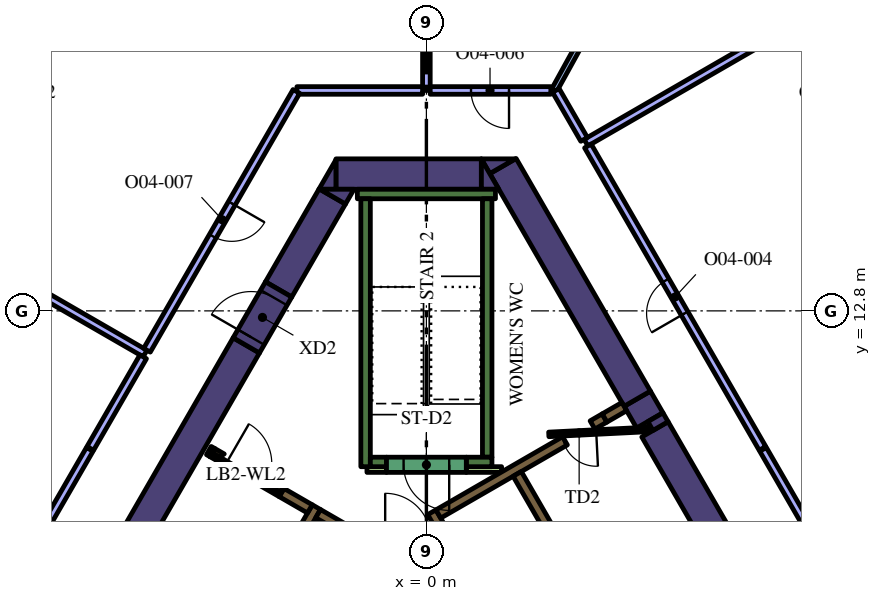
"""IFC4 building model, lengths in metres.
Left out: names, types, materials, properties, quantities, classifications, styles, units other than length and angle.
Written with IfcOpenShell. Run it as: python <this file> out.ifc"""

import sys

from ifc_helpers import new_model, si_unit, direction, frame, frame_2d, origin, place, context, subcontext, project, spatial, polyline, rectangle, outline, extrude, element, fill, save


model = new_model("IFC4")
c1 = context("Model", 3, precision=1e-05, world=origin(), true_north=direction((0.0, 1.0)))
c2 = subcontext(c1, "Body", "Model", "MODEL_VIEW")
j1 = project(units=[si_unit("LENGTHUNIT", "METRE"), si_unit("PLANEANGLEUNIT", "RADIAN")], contexts=[c1])
p1 = place(None, origin())
s1 = spatial("IfcSite", under=j1, at=p1, CompositionType="ELEMENT")
p2 = place(p1, origin())
s2 = spatial("IfcBuilding", under=s1, at=p2, CompositionType="ELEMENT")
p3 = place(p2, frame((0.0, 0.0, 179.4)))
s3 = spatial("IfcBuildingStorey", under=s2, at=p3, CompositionType="ELEMENT", Elevation=179.4)
p4 = place(p3, frame((5.878, 9.918, 0.0), z_axis=(0.0, 0.0, 1.0), x_axis=(-0.499893918903, 0.866086641072, 0.0)))
e1 = element("IfcWall", 1, at=p4, inside=s3, PredefinedType="SOLIDWALL", context=c2, shape_type="SweptSolid", body=[
    extrude(rectangle(XDim=0.657, YDim=0.8, at=frame_2d((0.329, 0.0))), origin(), (0.0, 0.0, 1.0), 4.2),
])
p5 = place(p3, frame((8.279, 5.761, 0.0), z_axis=(0.0, 0.0, 1.0), x_axis=(-0.500024261398, 0.866011396007, 0.0)))
e2 = element("IfcWall", 2, at=p5, inside=s3, PredefinedType="SOLIDWALL", context=c2, shape_type="SweptSolid", body=[
    extrude(rectangle(XDim=4.528, YDim=0.8, at=frame_2d((2.264, 0.0))), origin(), (0.0, 0.0, 1.0), 4.2),
])
p6 = place(p3, origin())
e3 = element("IfcWall", 3, at=p6, inside=s3, PredefinedType="SOLIDWALL", context=c2, shape_type="SweptSolid", body=[
    extrude(outline(polyline([(5.961, 9.654), (5.827, 9.886), (6.226, 10.116), (6.36, 9.884), (5.961, 9.654)])), origin(), (0.0, 0.0, 1.0), 4.2),
])
p7 = place(p3, frame((5.549, 10.489, 0.0), z_axis=(0.0, 0.0, 1.0), x_axis=(-0.50001746176, 0.866015321998, 0.0)))
e4 = element("IfcWall", 4, at=p7, inside=s3, PredefinedType="SOLIDWALL", context=c2, shape_type="SweptSolid", body=[
    extrude(rectangle(XDim=7.068, YDim=0.8, at=frame_2d((3.534, 0.0))), origin(), (0.0, 0.0, 1.0), 4.2),
])
e5 = element("IfcWall", 5, at=p6, inside=s3, PredefinedType="SOLIDWALL", context=c2, shape_type="SweptSolid", body=[
    extrude(outline(polyline([(1.443, 16.8), (2.339, 16.8), (1.667, 16.412), (1.443, 16.8)])), origin(), (0.0, 0.0, 1.0), 4.2),
])
p8 = place(p3, frame((-2.379, 16.4, 0.0), z_axis=(0.0, 0.0, 1.0), x_axis=(1.0, 0.0, 0.0)))
e6 = element("IfcWall", 6, at=p8, inside=s3, PredefinedType="SOLIDWALL", context=c2, shape_type="SweptSolid", body=[
    extrude(rectangle(XDim=3.824, YDim=0.8, at=frame_2d((1.912, 0.0))), origin(), (0.0, 0.0, 1.0), 4.2),
])
e7 = element("IfcWall", 7, at=p6, inside=s3, PredefinedType="SOLIDWALL", context=c2, shape_type="SweptSolid", body=[
    extrude(outline(polyline([(1.905, 16.0), (1.447, 16.0), (1.447, 16.793), (1.905, 16.0)])), origin(), (0.0, 0.0, 1.0), 4.2),
])
e8 = element("IfcWall", 8, at=p6, inside=s3, PredefinedType="SOLIDWALL", context=c2, shape_type="SweptSolid", body=[
    extrude(outline(polyline([(-2.829, 16.0), (-2.381, 16.776), (-2.381, 16.0), (-2.829, 16.0)])), origin(), (0.0, 0.0, 1.0), 4.2),
])
p9 = place(p3, frame((-2.477, 15.81, 0.0), z_axis=(0.0, 0.0, 1.0), x_axis=(-0.499969377405, -0.866043083026, 0.0)))
e9 = element("IfcWall", 9, at=p9, inside=s3, PredefinedType="SOLIDWALL", context=c2, shape_type="SweptSolid", body=[
    extrude(rectangle(XDim=2.824, YDim=0.8, at=frame_2d((1.412, 0.0))), origin(), (0.0, 0.0, 1.0), 4.2),
])
e10 = element("IfcWall", 10, at=p6, inside=s3, PredefinedType="SOLIDWALL", context=c2, shape_type="SweptSolid", body=[
    extrude(outline(polyline([(-1.905, 16.0), (-2.129, 15.612), (-2.801, 16.0), (-1.905, 16.0)])), origin(), (0.0, 0.0, 1.0), 4.2),
])
p10 = place(p3, frame((-12.668, -1.842, 0.0), z_axis=(0.0, 0.0, 1.0), x_axis=(0.500003640647, 0.866023301845, 0.0)))
e11 = element("IfcWall", 11, at=p10, inside=s3, PredefinedType="SOLIDWALL", context=c2, shape_type="SweptSolid", body=[
    extrude(rectangle(XDim=15.858, YDim=0.8, at=frame_2d((7.929, 0.0))), origin(), (0.0, 0.0, 1.0), 4.2),
])
p11 = place(p3, frame((-1.817, 15.875, 0.0), z_axis=(0.0, 0.0, 1.0), x_axis=(1.0, 0.0, 0.0)))
e12 = element("IfcWall", 12, at=p11, inside=s3, PredefinedType="SOLIDWALL", context=c2, shape_type="SweptSolid", body=[
    extrude(rectangle(XDim=3.634, YDim=0.25, at=frame_2d((1.817, 0.0))), origin(), (0.0, 0.0, 1.0), 4.2),
])
p12 = place(p3, frame((1.6, 8.95, 0.0), z_axis=(0.0, 0.0, 1.0), x_axis=(0.0, 1.0, 0.0)))
e13 = element("IfcWall", 13, at=p12, inside=s3, PredefinedType="SOLIDWALL", context=c2, shape_type="SweptSolid", body=[
    extrude(rectangle(XDim=6.8, YDim=0.25, at=frame_2d((3.4, 0.0))), origin(), (0.0, 0.0, 1.0), 4.2),
])
p13 = place(p3, frame((1.05, 8.825, 0.0), z_axis=(0.0, 0.0, 1.0), x_axis=(1.0, 0.0, 0.0)))
e14 = element("IfcWall", 14, at=p13, inside=s3, PredefinedType="SOLIDWALL", context=c2, shape_type="SweptSolid", body=[
    extrude(rectangle(XDim=0.675, YDim=0.25, at=frame_2d((0.337, 0.0))), origin(), (0.0, 0.0, 1.0), 4.2),
])
p14 = place(p3, frame((-1.6, 8.7, 0.0), z_axis=(0.0, 0.0, 1.0), x_axis=(0.0, 1.0, 0.0)))
e15 = element("IfcWall", 15, at=p14, inside=s3, PredefinedType="SOLIDWALL", context=c2, shape_type="SweptSolid", body=[
    extrude(rectangle(XDim=7.05, YDim=0.25, at=frame_2d((3.525, 0.0))), origin(), (0.0, 0.0, 1.0), 4.2),
])
p15 = place(p3, frame((-1.475, 8.825, 0.0), z_axis=(0.0, 0.0, 1.0), x_axis=(1.0, 0.0, 0.0)))
e16 = element("IfcWall", 16, at=p15, inside=s3, PredefinedType="SOLIDWALL", context=c2, shape_type="SweptSolid", body=[
    extrude(rectangle(XDim=0.425, YDim=0.25, at=frame_2d((0.212, 0.0))), origin(), (0.0, 0.0, 1.0), 4.2),
])
p16 = place(p3, frame((0.417, 7.027, 0.0), z_axis=(0.0, 0.0, 1.0), x_axis=(-0.500210807569, 0.865903659763, 0.0)))
e17 = element("IfcWall", 17, at=p16, inside=s3, PredefinedType="SOLIDWALL", context=c2, shape_type="SweptSolid", body=[
    extrude(rectangle(XDim=0.548, YDim=0.25, at=frame_2d((0.274, 0.0))), origin(), (0.0, 0.0, 1.0), 4.2),
])
p17 = place(p3, frame((3.647, 9.38, 0.0), z_axis=(0.0, 0.0, 1.0), x_axis=(-0.866025015791, -0.500000672024, 0.0)))
e18 = element("IfcWall", 18, at=p17, inside=s3, PredefinedType="SOLIDWALL", context=c2, shape_type="SweptSolid", body=[
    extrude(rectangle(XDim=3.849, YDim=0.25, at=frame_2d((1.924, 0.0))), origin(), (0.0, 0.0, 1.0), 4.2),
])
p18 = place(p3, frame((4.688, 9.981, 0.0), z_axis=(0.0, 0.0, 1.0), x_axis=(-0.865974312977, -0.500088481434, 0.0)))
e19 = element("IfcWall", 19, at=p18, inside=s3, PredefinedType="SOLIDWALL", context=c2, shape_type="SweptSolid", body=[
    extrude(rectangle(XDim=0.366, YDim=0.25, at=frame_2d((0.183, 0.0))), origin(), (0.0, 0.0, 1.0), 4.2),
])
p19 = place(p3, frame((4.689, 9.982, 0.0), z_axis=(0.0, 0.0, 1.0), x_axis=(0.865947592822, 0.500134748329, 0.0)))
e20 = element("IfcWall", 20, at=p19, inside=s3, PredefinedType="SOLIDWALL", context=c2, shape_type="SweptSolid", body=[
    extrude(rectangle(XDim=0.598, YDim=0.25, at=frame_2d((0.299, 0.0))), origin(), (0.0, 0.0, 1.0), 4.2),
])
p20 = place(p3, frame((-8.06, -1.311, 0.0), z_axis=(0.0, 0.0, 1.0), x_axis=(0.50000273126, 0.866023826885, 0.0)))
e21 = element("IfcWall", 21, at=p20, inside=s3, PredefinedType="SOLIDWALL", context=c2, shape_type="SweptSolid", body=[
    extrude(rectangle(XDim=10.33, YDim=0.25, at=frame_2d((5.165, 0.0))), origin(), (0.0, 0.0, 1.0), 4.2),
])
p21 = place(p3, frame((-1.76, 6.836, 0.0), z_axis=(0.0, 0.0, 1.0), x_axis=(-0.865952863304, 0.500125622755, 0.0)))
e22 = element("IfcWall", 22, at=p21, inside=s3, PredefinedType="SOLIDWALL", context=c2, shape_type="SweptSolid", body=[
    extrude(rectangle(XDim=1.258, YDim=0.25, at=frame_2d((0.629, 0.0))), origin(), (0.0, 0.0, 1.0), 4.2),
])
p22 = place(p3, frame((-5.725, 9.125, 0.0), z_axis=(0.0, 0.0, 1.0), x_axis=(0.866185586049, -0.49972245349, 0.0)))
e23 = element("IfcWall", 23, at=p22, inside=s3, PredefinedType="SOLIDWALL", context=c2, shape_type="SweptSolid", body=[
    extrude(rectangle(XDim=0.11, YDim=0.25, at=frame_2d((0.055, 0.0))), origin(), (0.0, 0.0, 1.0), 4.2),
])
p23 = place(p3, frame((-3.066, 7.59, 0.0), z_axis=(0.0, 0.0, 1.0), x_axis=(-0.866081358704, 0.49990307071, 0.0)))
e24 = element("IfcWall", 24, at=p23, inside=s3, PredefinedType="SOLIDWALL", context=c2, shape_type="SweptSolid", body=[
    extrude(rectangle(XDim=0.858, YDim=0.25, at=frame_2d((0.429, 0.0))), origin(), (0.0, 0.0, 1.0), 4.2),
])
e25 = element("IfcWall", 25, at=p6, inside=s3, PredefinedType="SOLIDWALL", context=c2, shape_type="SweptSolid", body=[
    extrude(outline(polyline([(-3.748, 8.128), (-3.813, 8.015), (-4.027, 8.139), (-4.017, 8.156), (-4.008, 8.173), (-4.0, 8.192), (-3.995, 8.21), (-3.991, 8.23), (-3.99, 8.25), (-3.99, 8.268), (-3.748, 8.128)])), origin(), (0.0, 0.0, 1.0), 4.2),
])
e26 = element("IfcWall", 26, at=p6, inside=s3, PredefinedType="SOLIDWALL", context=c2, shape_type="SweptSolid", body=[
    extrude(outline(polyline([(-5.689, 8.96), (-5.69, 8.961), (-5.565, 9.177), (-5.319, 9.035), (-5.335, 9.026), (-5.351, 9.015), (-5.366, 9.002), (-5.379, 8.988), (-5.392, 8.972), (-5.402, 8.956), (-5.412, 8.939), (-5.629, 9.064), (-5.629, 9.064), (-5.689, 8.96)])), origin(), (0.0, 0.0, 1.0), 4.2),
])
p24 = place(p3, frame((1.05, 8.625, 0.0), z_axis=(0.0, 0.0, 1.0), x_axis=(1.0, 0.0, 0.0)))
e27 = element("IfcWall", 27, at=p24, inside=s3, PredefinedType="PARTITIONING", context=c2, shape_type="SweptSolid", body=[
    extrude(rectangle(XDim=0.929, YDim=0.15, at=frame_2d((0.464, 0.0))), origin(), (0.0, 0.0, 1.0), 3.15),
])
p25 = place(p3, frame((-1.564, 8.625, 0.0), z_axis=(0.0, 0.0, 1.0), x_axis=(1.0, 0.0, 0.0)))
e28 = element("IfcWall", 28, at=p25, inside=s3, PredefinedType="PARTITIONING", context=c2, shape_type="SweptSolid", body=[
    extrude(rectangle(XDim=0.514, YDim=0.15, at=frame_2d((0.257, 0.0))), origin(), (0.0, 0.0, 1.0), 3.15),
])
p26 = place(p3, frame((8.565, -2.185, 0.0), z_axis=(0.0, 0.0, 1.0), x_axis=(-0.499997954832, 0.866026584559, 0.0)))
e29 = element("IfcWall", 29, at=p26, inside=s3, PredefinedType="SOLIDWALL", context=c2, shape_type="SweptSolid", body=[
    extrude(rectangle(XDim=12.35, YDim=0.25, at=frame_2d((6.175, 0.0))), origin(), (0.0, 0.0, 1.0), 4.2),
])
p27 = place(p26, frame((0.585, 0.0, 0.0)))
e30 = element("IfcOpeningElement", 30, at=p27, cuts=e29, PredefinedType="OPENING", context=c2, shape_type="SweptSolid", body=[
    extrude(rectangle(XDim=1.1, YDim=2.1, at=frame_2d((0.55, 1.05))), frame((0.0, 0.135, 0.0), z_axis=(0.0, -1.0, 0.0), x_axis=(1.0, 0.0, 0.0)), (0.0, 0.0, 1.0), 0.27),
])
p28 = place(p3, frame((1.05, 8.75, 0.0), z_axis=(0.0, 0.0, 1.0), x_axis=(-1.0, 0.0, 0.0)))
e31 = element("IfcWall", 31, at=p28, inside=s3, PredefinedType="SOLIDWALL", context=c2, shape_type="SweptSolid", body=[
    extrude(rectangle(XDim=2.1, YDim=0.4, at=frame_2d((1.05, 0.0))), origin(), (0.0, 0.0, 1.0), 4.2),
])
p29 = place(p28, frame((0.45, 0.0, 0.0)))
e32 = element("IfcOpeningElement", 32, at=p29, cuts=e31, PredefinedType="OPENING", context=c2, shape_type="SweptSolid", body=[
    extrude(rectangle(XDim=1.2, YDim=2.1, at=frame_2d((0.6, 1.05))), frame((0.0, 0.21, 0.0), z_axis=(0.0, -1.0, 0.0), x_axis=(1.0, 0.0, 0.0)), (0.0, 0.0, 1.0), 0.42),
])
p30 = place(p3, frame((5.917, 9.684, 0.0), z_axis=(0.0, 0.0, 1.0), x_axis=(-0.998758194515, -0.049820366212, 0.0)))
e33 = element("IfcWall", 33, at=p30, inside=s3, PredefinedType="PARTITIONING", context=c2, shape_type="SweptSolid", body=[
    extrude(rectangle(XDim=2.7, YDim=0.12, at=frame_2d((1.35, 0.0))), origin(), (0.0, 0.0, 1.0), 3.15),
])
p31 = place(p30, frame((1.45, 0.0, 0.0)))
e34 = element("IfcOpeningElement", 34, at=p31, cuts=e33, PredefinedType="OPENING", context=c2, shape_type="SweptSolid", body=[
    extrude(rectangle(XDim=0.9, YDim=2.1, at=frame_2d((0.45, 1.05))), frame((0.0, 0.07, 0.0), z_axis=(0.0, -1.0, 0.0), x_axis=(1.0, 0.0, 0.0)), (0.0, 0.0, 1.0), 0.14),
])
p32 = place(p3, frame((-5.659, 9.012, 0.0), z_axis=(0.0, 0.0, 1.0), x_axis=(0.866009402589, -0.500027713859, 0.0)))
e35 = element("IfcWall", 35, at=p32, inside=s3, PredefinedType="PARTITIONING", context=c2, shape_type="SweptSolid", body=[
    extrude(rectangle(XDim=2.1, YDim=0.12, at=frame_2d((1.05, 0.0))), origin(), (0.0, 0.0, 1.0), 3.15),
])
p33 = place(p32, frame((0.45, 0.0, 0.0)))
e36 = element("IfcOpeningElement", 36, at=p33, cuts=e35, PredefinedType="OPENING", context=c2, shape_type="SweptSolid", body=[
    extrude(rectangle(XDim=1.2, YDim=2.1, at=frame_2d((0.6, 1.05))), frame((0.0, 0.07, 0.0), z_axis=(0.0, -1.0, 0.0), x_axis=(1.0, 0.0, 0.0)), (0.0, 0.0, 1.0), 0.14),
])
p34 = place(p3, frame((-4.739, 11.892, 0.0), z_axis=(0.0, 0.0, 1.0), x_axis=(0.500062241894, 0.865989465428, 0.0)))
e37 = element("IfcWall", 37, at=p34, inside=s3, PredefinedType="SOLIDWALL", context=c2, shape_type="SweptSolid", body=[
    extrude(rectangle(XDim=1.7, YDim=0.8, at=frame_2d((0.85, 0.0))), origin(), (0.0, 0.0, 1.0), 4.2),
])
p35 = place(p34, frame((0.25, 0.0, 0.0)))
e38 = element("IfcOpeningElement", 38, at=p35, cuts=e37, PredefinedType="OPENING", context=c2, shape_type="SweptSolid", body=[
    extrude(rectangle(XDim=1.2, YDim=2.1, at=frame_2d((0.6, 1.05))), frame((0.0, 0.41, 0.0), z_axis=(0.0, -1.0, 0.0), x_axis=(1.0, 0.0, 0.0)), (0.0, 0.0, 1.0), 0.82),
])
p36 = place(p3, frame((4.2, 17.226, 0.0), z_axis=(0.0, 0.0, 1.0), x_axis=(0.866021486214, 0.500006785369, 0.0)))
e39 = element("IfcWall", 39, at=p36, inside=s3, PredefinedType="PARTITIONING", context=c2, shape_type="SweptSolid", body=[
    extrude(rectangle(XDim=8.126, YDim=0.2, at=frame_2d((4.063, 0.0))), origin(), (0.0, 0.0, 1.0), 3.15),
])
p37 = place(p3, frame((12.359, 3.094, 0.0), z_axis=(0.0, 0.0, 1.0), x_axis=(-0.500010275428, 0.866019471182, 0.0)))
e40 = element("IfcWall", 40, at=p37, inside=s3, PredefinedType="PARTITIONING", context=c2, shape_type="SweptSolid", body=[
    extrude(rectangle(XDim=7.0, YDim=0.2, at=frame_2d((3.5, 0.0))), origin(), (0.0, 0.0, 1.0), 3.15),
])
p38 = place(p3, frame((8.844, 9.182, 0.0), z_axis=(0.0, 0.0, 1.0), x_axis=(-0.50000000053, 0.866025403479, 0.0)))
e41 = element("IfcWall", 41, at=p38, inside=s3, PredefinedType="PARTITIONING", context=c2, shape_type="SweptSolid", body=[
    extrude(rectangle(XDim=9.188, YDim=0.2, at=frame_2d((4.594, 0.0))), origin(), (0.0, 0.0, 1.0), 3.15),
])
p39 = place(p38, frame((4.1, 0.0, 0.0)))
e42 = element("IfcOpeningElement", 42, at=p39, cuts=e41, PredefinedType="OPENING", context=c2, shape_type="SweptSolid", body=[
    extrude(rectangle(XDim=1.0, YDim=2.1, at=frame_2d((0.5, 1.05))), frame((0.0, 0.11, 0.0), z_axis=(0.0, -1.0, 0.0), x_axis=(1.0, 0.0, 0.0)), (0.0, 0.0, 1.0), 0.22),
])
p40 = place(p3, frame((7.698, 26.465, 0.0), z_axis=(0.0, 0.0, 1.0), x_axis=(-0.482998301798, -0.875621288263, 0.0)))
e43 = element("IfcWall", 43, at=p40, inside=s3, PredefinedType="PARTITIONING", context=c2, shape_type="SweptSolid", body=[
    extrude(rectangle(XDim=8.982, YDim=0.15, at=frame_2d((4.491, 0.0))), origin(), (0.0, 0.0, 1.0), 3.15),
])
p41 = place(p40, frame((4.083, 0.0, 0.0)))
e44 = element("IfcOpeningElement", 44, at=p41, cuts=e43, PredefinedType="OPENING", context=c2, shape_type="SweptSolid", body=[
    extrude(rectangle(XDim=0.9, YDim=2.1, at=frame_2d((0.45, 1.05))), frame((0.0, 0.085, 0.0), z_axis=(0.0, -1.0, 0.0), x_axis=(1.0, 0.0, 0.0)), (0.0, 0.0, 1.0), 0.17),
])
p42 = place(p3, frame((4.15, 17.312, 0.0), z_axis=(0.0, 0.0, 1.0), x_axis=(-0.499935638681, 0.86606255962, 0.0)))
e45 = element("IfcWall", 45, at=p42, inside=s3, PredefinedType="PARTITIONING", context=c2, shape_type="SweptSolid", body=[
    extrude(rectangle(XDim=1.487, YDim=0.2, at=frame_2d((0.744, 0.0))), origin(), (0.0, 0.0, 1.0), 3.15),
])
p43 = place(p3, frame((0.0, 18.6, 0.0), z_axis=(0.0, 0.0, 1.0), x_axis=(0.0, 1.0, 0.0)))
e46 = element("IfcWall", 46, at=p43, inside=s3, PredefinedType="PARTITIONING", context=c2, shape_type="SweptSolid", body=[
    extrude(rectangle(XDim=10.754, YDim=0.2, at=frame_2d((5.377, 0.0))), origin(), (0.0, 0.0, 1.0), 3.15),
])
p44 = place(p3, frame((3.274, 18.6, 0.0), z_axis=(0.0, 0.0, 1.0), x_axis=(-1.0, 0.0, 0.0)))
e47 = element("IfcWall", 47, at=p44, inside=s3, PredefinedType="PARTITIONING", context=c2, shape_type="SweptSolid", body=[
    extrude(rectangle(XDim=3.174, YDim=0.2, at=frame_2d((1.587, 0.0))), origin(), (0.0, 0.0, 1.0), 3.15),
])
p45 = place(p44, frame((1.1, 0.0, 0.0)))
e48 = element("IfcOpeningElement", 48, at=p45, cuts=e47, PredefinedType="OPENING", context=c2, shape_type="SweptSolid", body=[
    extrude(rectangle(XDim=1.0, YDim=2.1, at=frame_2d((0.5, 1.05))), frame((0.0, 0.11, 0.0), z_axis=(0.0, -1.0, 0.0), x_axis=(1.0, 0.0, 0.0)), (0.0, 0.0, 1.0), 0.22),
])
p46 = place(p3, frame((-7.403, 11.678, 0.0), z_axis=(0.0, 0.0, 1.0), x_axis=(-0.866029143232, 0.499993523031, 0.0)))
e49 = element("IfcWall", 49, at=p46, inside=s3, PredefinedType="PARTITIONING", context=c2, shape_type="SweptSolid", body=[
    extrude(rectangle(XDim=8.42, YDim=0.2, at=frame_2d((4.21, 0.0))), origin(), (0.0, 0.0, 1.0), 3.15),
])
p47 = place(p3, frame((-0.1, 18.6, 0.0), z_axis=(0.0, 0.0, 1.0), x_axis=(-1.0, 0.0, 0.0)))
e50 = element("IfcWall", 50, at=p47, inside=s3, PredefinedType="PARTITIONING", context=c2, shape_type="SweptSolid", body=[
    extrude(rectangle(XDim=3.306, YDim=0.2, at=frame_2d((1.653, 0.0))), origin(), (0.0, 0.0, 1.0), 3.15),
])
p48 = place(p3, frame((-3.421, 18.574, 0.0), z_axis=(0.0, 0.0, 1.0), x_axis=(-0.499989434416, -0.866031503741, 0.0)))
e51 = element("IfcWall", 51, at=p48, inside=s3, PredefinedType="PARTITIONING", context=c2, shape_type="SweptSolid", body=[
    extrude(rectangle(XDim=7.863, YDim=0.2, at=frame_2d((3.932, 0.0))), origin(), (0.0, 0.0, 1.0), 3.15),
])
p49 = place(p48, frame((3.4, 0.0, 0.0)))
e52 = element("IfcOpeningElement", 52, at=p49, cuts=e51, PredefinedType="OPENING", context=c2, shape_type="SweptSolid", body=[
    extrude(rectangle(XDim=1.0, YDim=2.1, at=frame_2d((0.5, 1.05))), frame((0.0, 0.11, 0.0), z_axis=(0.0, -1.0, 0.0), x_axis=(1.0, 0.0, 0.0)), (0.0, 0.0, 1.0), 0.22),
])
p50 = place(p3, frame((-8.859, 9.156, 0.0), z_axis=(0.0, 0.0, 1.0), x_axis=(-0.500010275428, -0.866019471182, 0.0)))
e53 = element("IfcWall", 53, at=p50, inside=s3, PredefinedType="PARTITIONING", context=c2, shape_type="SweptSolid", body=[
    extrude(rectangle(XDim=7.0, YDim=0.2, at=frame_2d((3.5, 0.0))), origin(), (0.0, 0.0, 1.0), 3.15),
])
p51 = place(p3, frame((-7.453, 11.591, 0.0), z_axis=(0.0, 0.0, 1.0), x_axis=(-0.499980749935, -0.866036517529, 0.0)))
e54 = element("IfcWall", 54, at=p51, inside=s3, PredefinedType="PARTITIONING", context=c2, shape_type="SweptSolid", body=[
    extrude(rectangle(XDim=2.782, YDim=0.2, at=frame_2d((1.391, 0.0))), origin(), (0.0, 0.0, 1.0), 3.15),
])
p52 = place(p3, frame((12.783, 19.171, 0.0), z_axis=(0.0, 0.0, 1.0), x_axis=(-0.551892811511, 0.833915058386, 0.0)))
e55 = element("IfcWall", 55, at=p52, inside=s3, PredefinedType="SOLIDWALL", context=c2, shape_type="SweptSolid", body=[
    extrude(rectangle(XDim=5.204, YDim=0.24, at=frame_2d((2.602, 0.0))), origin(), (0.0, 0.0, 1.0), 3.95),
])
p53 = place(p52, frame((0.248, 0.0, 0.9)))
e56 = element("IfcOpeningElement", 56, at=p53, cuts=e55, PredefinedType="OPENING", context=c2, shape_type="SweptSolid", body=[
    extrude(rectangle(XDim=1.5, YDim=2.55, at=frame_2d((0.75, 1.275))), frame((0.0, 0.13, 0.0), z_axis=(0.0, -1.0, 0.0), x_axis=(1.0, 0.0, 0.0)), (0.0, 0.0, 1.0), 0.26),
])
p54 = place(p52, frame((3.455, 0.0, 0.9)))
e57 = element("IfcOpeningElement", 57, at=p54, cuts=e55, PredefinedType="OPENING", context=c2, shape_type="SweptSolid", body=[
    extrude(rectangle(XDim=1.5, YDim=2.55, at=frame_2d((0.75, 1.275))), frame((0.0, 0.13, 0.0), z_axis=(0.0, -1.0, 0.0), x_axis=(1.0, 0.0, 0.0)), (0.0, 0.0, 1.0), 0.26),
])
p55 = place(p3, frame((-9.911, 23.51, 0.0), z_axis=(0.0, 0.0, 1.0), x_axis=(-0.551892811511, -0.833915058386, 0.0)))
e58 = element("IfcWall", 58, at=p55, inside=s3, PredefinedType="SOLIDWALL", context=c2, shape_type="SweptSolid", body=[
    extrude(rectangle(XDim=5.204, YDim=0.24, at=frame_2d((2.602, 0.0))), origin(), (0.0, 0.0, 1.0), 3.95),
])
p56 = place(p55, frame((0.248, 0.0, 0.9)))
e59 = element("IfcOpeningElement", 59, at=p56, cuts=e58, PredefinedType="OPENING", context=c2, shape_type="SweptSolid", body=[
    extrude(rectangle(XDim=1.5, YDim=2.55, at=frame_2d((0.75, 1.275))), frame((0.0, 0.13, 0.0), z_axis=(0.0, -1.0, 0.0), x_axis=(1.0, 0.0, 0.0)), (0.0, 0.0, 1.0), 0.26),
])
p57 = place(p55, frame((3.455, 0.0, 0.9)))
e60 = element("IfcOpeningElement", 60, at=p57, cuts=e58, PredefinedType="OPENING", context=c2, shape_type="SweptSolid", body=[
    extrude(rectangle(XDim=1.5, YDim=2.55, at=frame_2d((0.75, 1.275))), frame((0.0, 0.13, 0.0), z_axis=(0.0, -1.0, 0.0), x_axis=(1.0, 0.0, 0.0)), (0.0, 0.0, 1.0), 0.26),
])
p58 = place(p29, origin())
e61 = element("IfcDoor", 61, at=p58, inside=s3, OperationType="SINGLE_SWING_LEFT", PredefinedType="DOOR", context=c2, shape_type="SweptSolid", body=[
    extrude(rectangle(XDim=1.2, YDim=2.1, at=frame_2d((0.6, 1.05))), frame((0.0, 0.025, 0.0), z_axis=(0.0, -1.0, 0.0), x_axis=(1.0, 0.0, 0.0)), (0.0, 0.0, 1.0), 0.05),
])
fill(e32, e61)
p59 = place(p31, origin())
e62 = element("IfcDoor", 62, at=p59, inside=s3, OperationType="SINGLE_SWING_LEFT", PredefinedType="DOOR", context=c2, shape_type="SweptSolid", body=[
    extrude(rectangle(XDim=0.9, YDim=2.1, at=frame_2d((0.45, 1.05))), frame((0.0, 0.025, 0.0), z_axis=(0.0, -1.0, 0.0), x_axis=(1.0, 0.0, 0.0)), (0.0, 0.0, 1.0), 0.05),
])
fill(e34, e62)
p60 = place(p33, origin())
e63 = element("IfcDoor", 63, at=p60, inside=s3, OperationType="SINGLE_SWING_LEFT", PredefinedType="DOOR", context=c2, shape_type="SweptSolid", body=[
    extrude(rectangle(XDim=1.2, YDim=2.1, at=frame_2d((0.6, 1.05))), frame((0.0, 0.025, 0.0), z_axis=(0.0, -1.0, 0.0), x_axis=(1.0, 0.0, 0.0)), (0.0, 0.0, 1.0), 0.05),
])
fill(e36, e63)
p61 = place(p35, origin())
e64 = element("IfcDoor", 64, at=p61, inside=s3, OperationType="SINGLE_SWING_LEFT", PredefinedType="DOOR", context=c2, shape_type="SweptSolid", body=[
    extrude(rectangle(XDim=1.2, YDim=2.1, at=frame_2d((0.6, 1.05))), frame((0.0, 0.025, 0.0), z_axis=(0.0, -1.0, 0.0), x_axis=(1.0, 0.0, 0.0)), (0.0, 0.0, 1.0), 0.05),
])
fill(e38, e64)
p62 = place(p39, origin())
e65 = element("IfcDoor", 65, at=p62, inside=s3, OperationType="SINGLE_SWING_RIGHT", PredefinedType="DOOR", context=c2, shape_type="SweptSolid", body=[
    extrude(rectangle(XDim=1.0, YDim=2.1, at=frame_2d((0.5, 1.05))), frame((0.0, 0.025, 0.0), z_axis=(0.0, -1.0, 0.0), x_axis=(1.0, 0.0, 0.0)), (0.0, 0.0, 1.0), 0.05),
])
fill(e42, e65)
p63 = place(p45, origin())
e66 = element("IfcDoor", 66, at=p63, inside=s3, OperationType="SINGLE_SWING_RIGHT", PredefinedType="DOOR", context=c2, shape_type="SweptSolid", body=[
    extrude(rectangle(XDim=1.0, YDim=2.1, at=frame_2d((0.5, 1.05))), frame((0.0, 0.025, 0.0), z_axis=(0.0, -1.0, 0.0), x_axis=(1.0, 0.0, 0.0)), (0.0, 0.0, 1.0), 0.05),
])
fill(e48, e66)
p64 = place(p49, origin())
e67 = element("IfcDoor", 67, at=p64, inside=s3, OperationType="SINGLE_SWING_LEFT", PredefinedType="DOOR", context=c2, shape_type="SweptSolid", body=[
    extrude(rectangle(XDim=1.0, YDim=2.1, at=frame_2d((0.5, 1.05))), frame((0.0, 0.025, 0.0), z_axis=(0.0, -1.0, 0.0), x_axis=(1.0, 0.0, 0.0)), (0.0, 0.0, 1.0), 0.05),
])
fill(e52, e67)
save(model, sys.argv[1])
